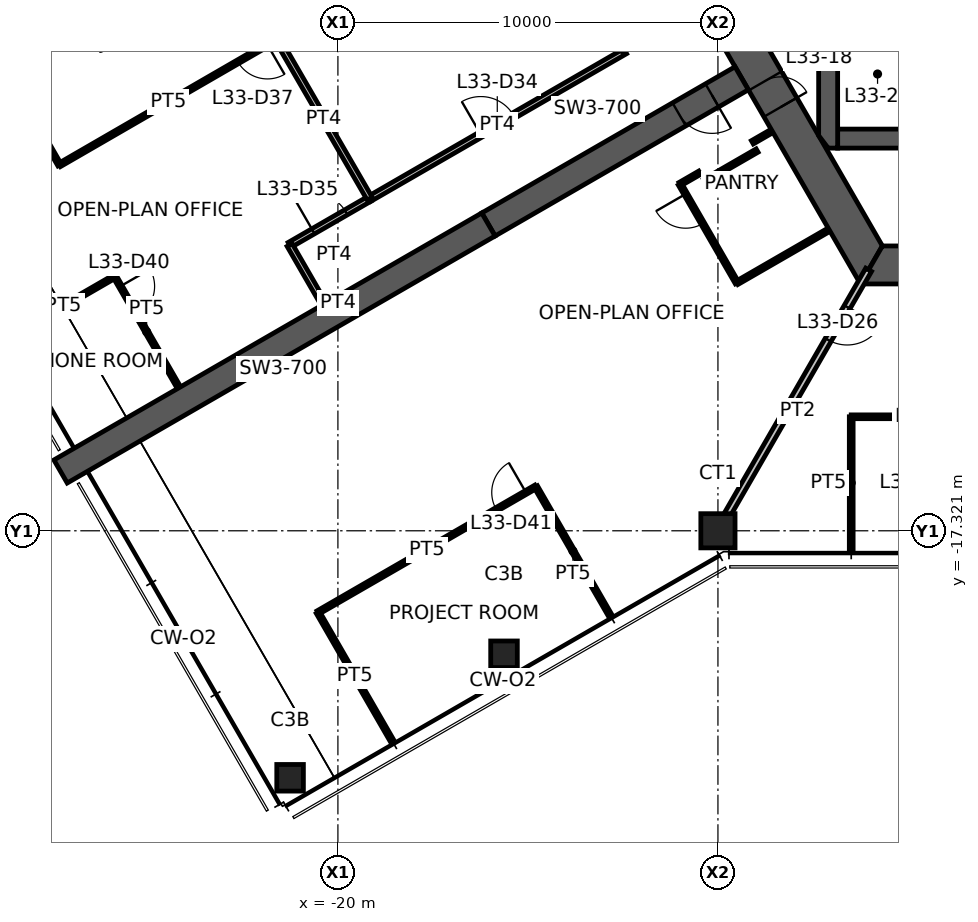
"""IFC4 building model, lengths in metres.
Left out: names, types, materials, properties, quantities, classifications, styles, units other than length and angle.
Written with IfcOpenShell. Run it as: python <this file> out.ifc"""

import sys

from ifc_helpers import new_model, si_unit, direction, frame, frame_2d, origin, origin_2d, place, context, subcontext, project, spatial, polyline, rectangle, hollow_rectangle, outline, extrude, element, fill, save


model = new_model("IFC4")
c1 = context("Model", 3, precision=1e-05, world=origin(), true_north=direction((0.0, 1.0)))
c2 = subcontext(c1, "Body", "Model", "MODEL_VIEW")
j1 = project(units=[si_unit("LENGTHUNIT", "METRE"), si_unit("PLANEANGLEUNIT", "RADIAN")], contexts=[c1])
p1 = place(None, origin())
s1 = spatial("IfcSite", under=j1, at=p1, CompositionType="ELEMENT")
p2 = place(p1, origin())
s2 = spatial("IfcBuilding", under=s1, at=p2, CompositionType="ELEMENT")
p3 = place(p2, frame((0.0, 0.0, 133.1)))
s3 = spatial("IfcBuildingStorey", under=s2, at=p3, CompositionType="ELEMENT", Elevation=133.1)
p4 = place(p3, frame((-10.0, -17.321, 0.0), z_axis=(0.0, 0.0, 1.0), x_axis=(1.0, 0.0, 0.0)))
e1 = element("IfcColumn", 1, at=p4, inside=s3, PredefinedType="COLUMN", context=c2, shape_type="SweptSolid", body=[
    extrude(hollow_rectangle(XDim=0.9, YDim=0.9, WallThickness=0.07, at=origin_2d()), origin(), (0.0, 0.0, 1.0), 3.9),
])
for number, where, z_axis, x_axis in (
    (2, (-15.629, -20.571, 0.0), (0.0, 0.0, 1.0), (1.0, 0.0, 0.0)),
    (3, (-21.258, -23.821, 0.0), (0.0, 0.0, 1.0), (1.0, 0.0, 0.0)),
):
    element("IfcColumn", number, at=place(p3, frame(where, z_axis=z_axis, x_axis=x_axis)), inside=s3, PredefinedType="COLUMN", context=c2, shape_type="SweptSolid", body=[
        extrude(hollow_rectangle(XDim=0.7, YDim=0.7, WallThickness=0.036, at=origin_2d()), origin(), (0.0, 0.0, 1.0), 3.9),
    ])
p5 = place(p3, frame((-11.922, 0.0, 0.0), z_axis=(0.0, 0.0, 1.0), x_axis=(0.500004296715, -0.866022923061, 0.0)))
e4 = element("IfcWall", 4, at=p5, inside=s3, PredefinedType="SHEAR", context=c2, shape_type="SweptSolid", body=[
    extrude(outline(polyline([(-0.289, -0.5), (6.331, -0.5), (7.131, -0.5), (12.211, -0.5), (11.634, 0.5), (7.131, 0.5), (6.331, 0.5), (0.289, 0.5), (-0.289, -0.5)])), origin(), (0.0, 0.0, 1.0), 3.9),
])
p6 = place(p5, frame((6.331, 0.0, 0.0)))
e5 = element("IfcOpeningElement", 5, at=p6, cuts=e4, PredefinedType="OPENING", context=c2, shape_type="SweptSolid", body=[
    extrude(rectangle(XDim=0.8, YDim=2.1, at=frame_2d((0.4, 1.05))), frame((0.0, 0.51, 0.0), z_axis=(0.0, -1.0, 0.0), x_axis=(1.0, 0.0, 0.0)), (0.0, 0.0, 1.0), 1.02),
])
p7 = place(p3, frame((-5.961, -10.325, 0.0), z_axis=(0.0, 0.0, 1.0), x_axis=(1.0, 0.0, 0.0)))
e6 = element("IfcWall", 6, at=p7, inside=s3, PredefinedType="SHEAR", context=c2, shape_type="SweptSolid", body=[
    extrude(outline(polyline([(-0.289, -0.5), (5.461, -0.5), (6.461, -0.5), (12.211, -0.5), (11.634, 0.5), (6.461, 0.5), (5.461, 0.5), (0.289, 0.5), (-0.289, -0.5)])), origin(), (0.0, 0.0, 1.0), 3.9),
])
p8 = place(p7, frame((5.461, 0.0, 0.0)))
e7 = element("IfcOpeningElement", 7, at=p8, cuts=e6, PredefinedType="OPENING", context=c2, shape_type="SweptSolid", body=[
    extrude(rectangle(XDim=1.0, YDim=2.1, at=frame_2d((0.5, 1.05))), frame((0.0, 0.51, 0.0), z_axis=(0.0, -1.0, 0.0), x_axis=(1.0, 0.0, 0.0)), (0.0, 0.0, 1.0), 1.02),
])
p9 = place(p3, frame((-9.375, -5.413, 0.0), z_axis=(0.0, 0.0, 1.0), x_axis=(-0.866032377459, -0.499987921047, 0.0)))
e8 = element("IfcWall", 8, at=p9, inside=s3, PredefinedType="SHEAR", context=c2, shape_type="SweptSolid", body=[
    extrude(rectangle(XDim=7.696, YDim=0.7, at=frame_2d((3.848, 0.0))), origin(), (0.0, 0.0, 1.0), 3.9),
])
p10 = place(p9, frame((0.9, 0.0, 0.0)))
e9 = element("IfcOpeningElement", 9, at=p10, cuts=e8, PredefinedType="OPENING", context=c2, shape_type="SweptSolid", body=[
    extrude(rectangle(XDim=1.0, YDim=2.1, at=frame_2d((0.5, 1.05))), frame((0.0, 0.36, 0.0), z_axis=(0.0, -1.0, 0.0), x_axis=(1.0, 0.0, 0.0)), (0.0, 0.0, 1.0), 0.72),
])
p11 = place(p3, frame((-16.039, -9.26, 0.0), z_axis=(0.0, 0.0, 1.0), x_axis=(-0.866024837091, -0.50000098154, 0.0)))
e10 = element("IfcWall", 10, at=p11, inside=s3, PredefinedType="SHEAR", context=c2, shape_type="SweptSolid", body=[
    extrude(rectangle(XDim=13.0, YDim=0.7, at=frame_2d((6.5, 0.0))), origin(), (0.0, 0.0, 1.0), 3.9),
])
p12 = place(p3, frame((-6.85, -7.0, 0.0), z_axis=(0.0, 0.0, 1.0), x_axis=(1.0, 0.0, 0.0)))
e11 = element("IfcWall", 11, at=p12, inside=s3, PredefinedType="SHEAR", context=c2, shape_type="SweptSolid", body=[
    extrude(rectangle(XDim=2.1, YDim=0.5, at=frame_2d((1.05, 0.0))), origin(), (0.0, 0.0, 1.0), 3.9),
])
p13 = place(p3, frame((-7.1, -3.85, 0.0), z_axis=(0.0, 0.0, 1.0), x_axis=(0.0, -1.0, 0.0)))
e12 = element("IfcWall", 12, at=p13, inside=s3, PredefinedType="SHEAR", context=c2, shape_type="SweptSolid", body=[
    extrude(outline(polyline([(0.0, -0.25), (3.069, -0.25), (3.4, 0.0), (3.4, 0.25), (0.0, 0.25), (0.0, -0.25)])), origin(), (0.0, 0.0, 1.0), 3.9),
])
p14 = place(p3, frame((-6.035, -10.453, 0.0), z_axis=(0.0, 0.0, 1.0), x_axis=(-0.499989830942, -0.866031274813, 0.0)))
e13 = element("IfcWall", 13, at=p14, inside=s3, PredefinedType="PARTITIONING", context=c2, shape_type="SweptSolid", body=[
    extrude(rectangle(XDim=7.93, YDim=0.175, at=frame_2d((3.965, 0.0))), origin(), (0.0, 0.0, 1.0), 3.05),
])
p15 = place(p14, frame((1.13, 0.0, 0.0)))
e14 = element("IfcOpeningElement", 14, at=p15, cuts=e13, PredefinedType="OPENING", context=c2, shape_type="SweptSolid", body=[
    extrude(rectangle(XDim=1.0, YDim=2.1, at=frame_2d((0.5, 1.05))), frame((0.0, 0.098, 0.0), z_axis=(0.0, -1.0, 0.0), x_axis=(1.0, 0.0, 0.0)), (0.0, 0.0, 1.0), 0.195),
])
p16 = place(p3, frame((-19.171, -8.586, 0.0), z_axis=(0.0, 0.0, 1.0), x_axis=(0.866007176269, 0.500031569654, 0.0)))
e15 = element("IfcWall", 15, at=p16, inside=s3, PredefinedType="PARTITIONING", context=c2, shape_type="SweptSolid", body=[
    extrude(rectangle(XDim=7.771, YDim=0.15, at=frame_2d((3.885, 0.0))), origin(), (0.0, 0.0, 1.0), 2.95),
])
p17 = place(p16, frame((3.385, 0.0, 0.0)))
e16 = element("IfcOpeningElement", 16, at=p17, cuts=e15, PredefinedType="OPENING", context=c2, shape_type="SweptSolid", body=[
    extrude(rectangle(XDim=1.0, YDim=2.1, at=frame_2d((0.5, 1.05))), frame((0.0, 0.085, 0.0), z_axis=(0.0, -1.0, 0.0), x_axis=(1.0, 0.0, 0.0)), (0.0, 0.0, 1.0), 0.17),
])
p18 = place(p3, frame((-12.442, -4.7, 0.0), z_axis=(0.0, 0.0, 1.0), x_axis=(-0.500009286329, 0.866020042254, 0.0)))
e17 = element("IfcWall", 17, at=p18, inside=s3, PredefinedType="PARTITIONING", context=c2, shape_type="SweptSolid", body=[
    extrude(rectangle(XDim=5.428, YDim=0.15, at=frame_2d((2.714, 0.0))), origin(), (0.0, 0.0, 1.0), 2.95),
])
p19 = place(p3, frame((-21.271, -9.798, 0.0), z_axis=(0.0, 0.0, 1.0), x_axis=(0.866025270247, 0.500000231294, 0.0)))
e18 = element("IfcWall", 18, at=p19, inside=s3, PredefinedType="PARTITIONING", context=c2, shape_type="SweptSolid", body=[
    extrude(rectangle(XDim=2.435, YDim=0.15, at=frame_2d((1.217, 0.0))), origin(), (0.0, 0.0, 1.0), 2.95),
])
p20 = place(p19, frame((0.717, 0.0, 0.0)))
e19 = element("IfcOpeningElement", 19, at=p20, cuts=e18, PredefinedType="OPENING", context=c2, shape_type="SweptSolid", body=[
    extrude(rectangle(XDim=1.0, YDim=2.1, at=frame_2d((0.5, 1.05))), frame((0.0, 0.085, 0.0), z_axis=(0.0, -1.0, 0.0), x_axis=(1.0, 0.0, 0.0)), (0.0, 0.0, 1.0), 0.17),
])
p21 = place(p3, frame((-20.381, -11.34, 0.0), z_axis=(0.0, 0.0, 1.0), x_axis=(-0.500062787734, 0.865989150234, 0.0)))
e20 = element("IfcWall", 20, at=p21, inside=s3, PredefinedType="PARTITIONING", context=c2, shape_type="SweptSolid", body=[
    extrude(rectangle(XDim=1.78, YDim=0.15, at=frame_2d((0.89, 0.0))), origin(), (0.0, 0.0, 1.0), 2.95),
])
p22 = place(p3, frame((-27.325, -7.693, 0.0), z_axis=(0.0, 0.0, 1.0), x_axis=(-0.499989765943, 0.866031312339, 0.0)))
e21 = element("IfcWall", 21, at=p22, inside=s3, PredefinedType="PARTITIONING", context=c2, shape_type="SweptSolid", body=[
    extrude(rectangle(XDim=3.505, YDim=0.1, at=frame_2d((1.752, 0.0))), origin(), (0.0, 0.0, 1.0), 2.95),
])
p23 = place(p3, frame((-21.594, -4.379, 0.0), z_axis=(0.0, 0.0, 1.0), x_axis=(-0.865682888643, -0.500592784916, 0.0)))
e22 = element("IfcWall", 22, at=p23, inside=s3, PredefinedType="PARTITIONING", context=c2, shape_type="SweptSolid", body=[
    extrude(rectangle(XDim=6.62, YDim=0.1, at=frame_2d((3.31, 0.0))), origin(), (0.0, 0.0, 1.0), 2.95),
])
p24 = place(p23, frame((0.3, 0.0, 0.0)))
e23 = element("IfcOpeningElement", 23, at=p24, cuts=e22, PredefinedType="OPENING", context=c2, shape_type="SweptSolid", body=[
    extrude(rectangle(XDim=0.9, YDim=2.1, at=frame_2d((0.45, 1.05))), frame((0.0, 0.06, 0.0), z_axis=(0.0, -1.0, 0.0), x_axis=(1.0, 0.0, 0.0)), (0.0, 0.0, 1.0), 0.12),
])
p25 = place(p3, frame((-28.562, -12.18, 0.0), z_axis=(0.0, 0.0, 1.0), x_axis=(0.866042875753, 0.499969736442, 0.0)))
e24 = element("IfcWall", 24, at=p25, inside=s3, PredefinedType="PARTITIONING", context=c2, shape_type="SweptSolid", body=[
    extrude(rectangle(XDim=3.105, YDim=0.1, at=frame_2d((1.553, 0.0))), origin(), (0.0, 0.0, 1.0), 2.95),
])
p26 = place(p3, frame((-25.873, -10.627, 0.0), z_axis=(0.0, 0.0, 1.0), x_axis=(0.5000115033, -0.866018762249, 0.0)))
e25 = element("IfcWall", 25, at=p26, inside=s3, PredefinedType="PARTITIONING", context=c2, shape_type="SweptSolid", body=[
    extrude(rectangle(XDim=3.363, YDim=0.1, at=frame_2d((1.682, 0.0))), origin(), (0.0, 0.0, 1.0), 2.95),
])
p27 = place(p26, frame((0.3, 0.0, 0.0)))
e26 = element("IfcOpeningElement", 26, at=p27, cuts=e25, PredefinedType="OPENING", context=c2, shape_type="SweptSolid", body=[
    extrude(rectangle(XDim=0.9, YDim=2.1, at=frame_2d((0.45, 1.05))), frame((0.0, 0.06, 0.0), z_axis=(0.0, -1.0, 0.0), x_axis=(1.0, 0.0, 0.0)), (0.0, 0.0, 1.0), 0.12),
])
p28 = place(p3, frame((-19.163, -8.581, 0.0), z_axis=(0.0, 0.0, 1.0), x_axis=(-0.500843945189, 0.865537603209, 0.0)))
e27 = element("IfcWall", 27, at=p28, inside=s3, PredefinedType="PARTITIONING", context=c2, shape_type="SweptSolid", body=[
    extrude(rectangle(XDim=4.854, YDim=0.15, at=frame_2d((2.427, 0.0))), origin(), (0.0, 0.0, 1.0), 2.95),
])
p29 = place(p3, frame((-20.525, -19.471, 0.0), z_axis=(0.0, 0.0, 1.0), x_axis=(0.866021597574, 0.500006592492, 0.0)))
e28 = element("IfcWall", 28, at=p29, inside=s3, PredefinedType="PARTITIONING", context=c2, shape_type="SweptSolid", body=[
    extrude(rectangle(XDim=6.62, YDim=0.1, at=frame_2d((3.31, 0.0))), origin(), (0.0, 0.0, 1.0), 2.95),
])
p30 = place(p29, frame((5.42, 0.0, 0.0)))
e29 = element("IfcOpeningElement", 29, at=p30, cuts=e28, PredefinedType="OPENING", context=c2, shape_type="SweptSolid", body=[
    extrude(rectangle(XDim=0.9, YDim=2.1, at=frame_2d((0.45, 1.05))), frame((0.0, 0.06, 0.0), z_axis=(0.0, -1.0, 0.0), x_axis=(1.0, 0.0, 0.0)), (0.0, 0.0, 1.0), 0.12),
])
p31 = place(p3, frame((-18.585, -22.831, 0.0), z_axis=(0.0, 0.0, 1.0), x_axis=(-0.499996613652, 0.866027358884, 0.0)))
e30 = element("IfcWall", 30, at=p31, inside=s3, PredefinedType="PARTITIONING", context=c2, shape_type="SweptSolid", body=[
    extrude(rectangle(XDim=3.88, YDim=0.1, at=frame_2d((1.94, 0.0))), origin(), (0.0, 0.0, 1.0), 2.95),
])
p32 = place(p3, frame((-14.792, -16.161, 0.0), z_axis=(0.0, 0.0, 1.0), x_axis=(0.500025510799, -0.866010674617, 0.0)))
e31 = element("IfcWall", 31, at=p32, inside=s3, PredefinedType="PARTITIONING", context=c2, shape_type="SweptSolid", body=[
    extrude(rectangle(XDim=3.905, YDim=0.1, at=frame_2d((1.953, 0.0))), origin(), (0.0, 0.0, 1.0), 2.95),
])
p33 = place(p3, frame((-11.0, -8.198, 0.0), z_axis=(0.0, 0.0, 1.0), x_axis=(0.866131372301, 0.499816412211, 0.0)))
e32 = element("IfcWall", 32, at=p33, inside=s3, PredefinedType="PARTITIONING", context=c2, shape_type="SweptSolid", body=[
    extrude(rectangle(XDim=0.6, YDim=0.1, at=frame_2d((0.3, 0.0))), origin(), (0.0, 0.0, 1.0), 2.95),
])
p34 = place(p3, frame((-10.355, -8.115, 0.0), z_axis=(0.0, 0.0, 1.0), x_axis=(0.866094119867, 0.499880961361, 0.0)))
e33 = element("IfcWall", 33, at=p34, inside=s3, PredefinedType="PARTITIONING", context=c2, shape_type="SweptSolid", body=[
    extrude(rectangle(XDim=1.6, YDim=0.1, at=frame_2d((0.8, 0.0))), origin(), (0.0, 0.0, 1.0), 2.95),
])
p35 = place(p3, frame((-9.5, -10.796, 0.0), z_axis=(0.0, 0.0, 1.0), x_axis=(-0.499990139034, 0.866031096941, 0.0)))
e34 = element("IfcWall", 34, at=p35, inside=s3, PredefinedType="PARTITIONING", context=c2, shape_type="SweptSolid", body=[
    extrude(rectangle(XDim=3.0, YDim=0.1, at=frame_2d((1.5, 0.0))), origin(), (0.0, 0.0, 1.0), 2.95),
])
p36 = place(p35, frame((1.8, 0.0, 0.0)))
e35 = element("IfcOpeningElement", 35, at=p36, cuts=e34, PredefinedType="OPENING", context=c2, shape_type="SweptSolid", body=[
    extrude(rectangle(XDim=0.9, YDim=2.1, at=frame_2d((0.45, 1.05))), frame((0.0, 0.06, 0.0), z_axis=(0.0, -1.0, 0.0), x_axis=(1.0, 0.0, 0.0)), (0.0, 0.0, 1.0), 0.12),
])
p37 = place(p3, frame((-9.094, -7.098, 0.0), z_axis=(0.0, 0.0, 1.0), x_axis=(0.865954211699, 0.50012328804, 0.0)))
e36 = element("IfcWall", 36, at=p37, inside=s3, PredefinedType="PARTITIONING", context=c2, shape_type="SweptSolid", body=[
    extrude(rectangle(XDim=0.58, YDim=0.1, at=frame_2d((0.29, 0.0))), origin(), (0.0, 0.0, 1.0), 2.95),
])
p38 = place(p3, frame((-7.092, -9.406, 0.0), z_axis=(0.0, 0.0, 1.0), x_axis=(-0.86603494908, -0.499983466698, 0.0)))
e37 = element("IfcWall", 37, at=p38, inside=s3, PredefinedType="PARTITIONING", context=c2, shape_type="SweptSolid", body=[
    extrude(rectangle(XDim=2.78, YDim=0.1, at=frame_2d((1.39, 0.0))), origin(), (0.0, 0.0, 1.0), 2.95),
])
p39 = place(p3, frame((-6.493, -17.801, 0.0), z_axis=(0.0, 0.0, 1.0), x_axis=(0.0, 1.0, 0.0)))
e38 = element("IfcWall", 38, at=p39, inside=s3, PredefinedType="PARTITIONING", context=c2, shape_type="SweptSolid", body=[
    extrude(rectangle(XDim=3.48, YDim=0.1, at=frame_2d((1.74, 0.0))), origin(), (0.0, 0.0, 1.0), 2.95),
])
p40 = place(p3, frame((-6.493, -14.321, 0.0), z_axis=(0.0, 0.0, 1.0), x_axis=(1.0, 0.0, 0.0)))
e39 = element("IfcWall", 39, at=p40, inside=s3, PredefinedType="PARTITIONING", context=c2, shape_type="SweptSolid", body=[
    extrude(rectangle(XDim=3.247, YDim=0.1, at=frame_2d((1.623, 0.0))), origin(), (0.0, 0.0, 1.0), 2.95),
])
p41 = place(p6, origin())
e40 = element("IfcDoor", 40, at=p41, inside=s3, OperationType="SINGLE_SWING_RIGHT", PredefinedType="DOOR", context=c2, shape_type="SweptSolid", body=[
    extrude(rectangle(XDim=0.8, YDim=2.1, at=frame_2d((0.4, 1.05))), frame((0.0, 0.025, 0.0), z_axis=(0.0, -1.0, 0.0), x_axis=(1.0, 0.0, 0.0)), (0.0, 0.0, 1.0), 0.05),
])
fill(e5, e40)
p42 = place(p10, origin())
e41 = element("IfcDoor", 41, at=p42, inside=s3, OperationType="SINGLE_SWING_LEFT", PredefinedType="DOOR", context=c2, shape_type="SweptSolid", body=[
    extrude(rectangle(XDim=1.0, YDim=2.1, at=frame_2d((0.5, 1.05))), frame((0.0, 0.025, 0.0), z_axis=(0.0, -1.0, 0.0), x_axis=(1.0, 0.0, 0.0)), (0.0, 0.0, 1.0), 0.05),
])
fill(e9, e41)
p43 = place(p15, origin())
e42 = element("IfcDoor", 42, at=p43, inside=s3, OperationType="SINGLE_SWING_LEFT", PredefinedType="DOOR", context=c2, shape_type="SweptSolid", body=[
    extrude(rectangle(XDim=1.0, YDim=2.1, at=frame_2d((0.5, 1.05))), frame((0.0, 0.025, 0.0), z_axis=(0.0, -1.0, 0.0), x_axis=(1.0, 0.0, 0.0)), (0.0, 0.0, 1.0), 0.05),
])
fill(e14, e42)
p44 = place(p17, origin())
e43 = element("IfcDoor", 43, at=p44, inside=s3, OperationType="SINGLE_SWING_LEFT", PredefinedType="DOOR", context=c2, shape_type="SweptSolid", body=[
    extrude(rectangle(XDim=1.0, YDim=2.1, at=frame_2d((0.5, 1.05))), frame((0.0, 0.025, 0.0), z_axis=(0.0, -1.0, 0.0), x_axis=(1.0, 0.0, 0.0)), (0.0, 0.0, 1.0), 0.05),
])
fill(e16, e43)
p45 = place(p20, origin())
e44 = element("IfcDoor", 44, at=p45, inside=s3, OperationType="SINGLE_SWING_LEFT", PredefinedType="DOOR", context=c2, shape_type="SweptSolid", body=[
    extrude(rectangle(XDim=1.0, YDim=2.1, at=frame_2d((0.5, 1.05))), frame((0.0, 0.025, 0.0), z_axis=(0.0, -1.0, 0.0), x_axis=(1.0, 0.0, 0.0)), (0.0, 0.0, 1.0), 0.05),
])
fill(e19, e44)
p46 = place(p24, origin())
e45 = element("IfcDoor", 45, at=p46, inside=s3, OperationType="SINGLE_SWING_LEFT", PredefinedType="DOOR", context=c2, shape_type="SweptSolid", body=[
    extrude(rectangle(XDim=0.9, YDim=2.1, at=frame_2d((0.45, 1.05))), frame((0.0, 0.025, 0.0), z_axis=(0.0, -1.0, 0.0), x_axis=(1.0, 0.0, 0.0)), (0.0, 0.0, 1.0), 0.05),
])
fill(e23, e45)
p47 = place(p27, origin())
e46 = element("IfcDoor", 46, at=p47, inside=s3, OperationType="SINGLE_SWING_LEFT", PredefinedType="DOOR", context=c2, shape_type="SweptSolid", body=[
    extrude(rectangle(XDim=0.9, YDim=2.1, at=frame_2d((0.45, 1.05))), frame((0.0, 0.025, 0.0), z_axis=(0.0, -1.0, 0.0), x_axis=(1.0, 0.0, 0.0)), (0.0, 0.0, 1.0), 0.05),
])
fill(e26, e46)
p48 = place(p30, origin())
e47 = element("IfcDoor", 47, at=p48, inside=s3, OperationType="SINGLE_SWING_RIGHT", PredefinedType="DOOR", context=c2, shape_type="SweptSolid", body=[
    extrude(rectangle(XDim=0.9, YDim=2.1, at=frame_2d((0.45, 1.05))), frame((0.0, 0.025, 0.0), z_axis=(0.0, -1.0, 0.0), x_axis=(1.0, 0.0, 0.0)), (0.0, 0.0, 1.0), 0.05),
])
fill(e29, e47)
p49 = place(p36, origin())
e48 = element("IfcDoor", 48, at=p49, inside=s3, OperationType="SINGLE_SWING_RIGHT", PredefinedType="DOOR", context=c2, shape_type="SweptSolid", body=[
    extrude(rectangle(XDim=0.9, YDim=2.1, at=frame_2d((0.45, 1.05))), frame((0.0, 0.025, 0.0), z_axis=(0.0, -1.0, 0.0), x_axis=(1.0, 0.0, 0.0)), (0.0, 0.0, 1.0), 0.05),
])
fill(e35, e48)
save(model, sys.argv[1])
